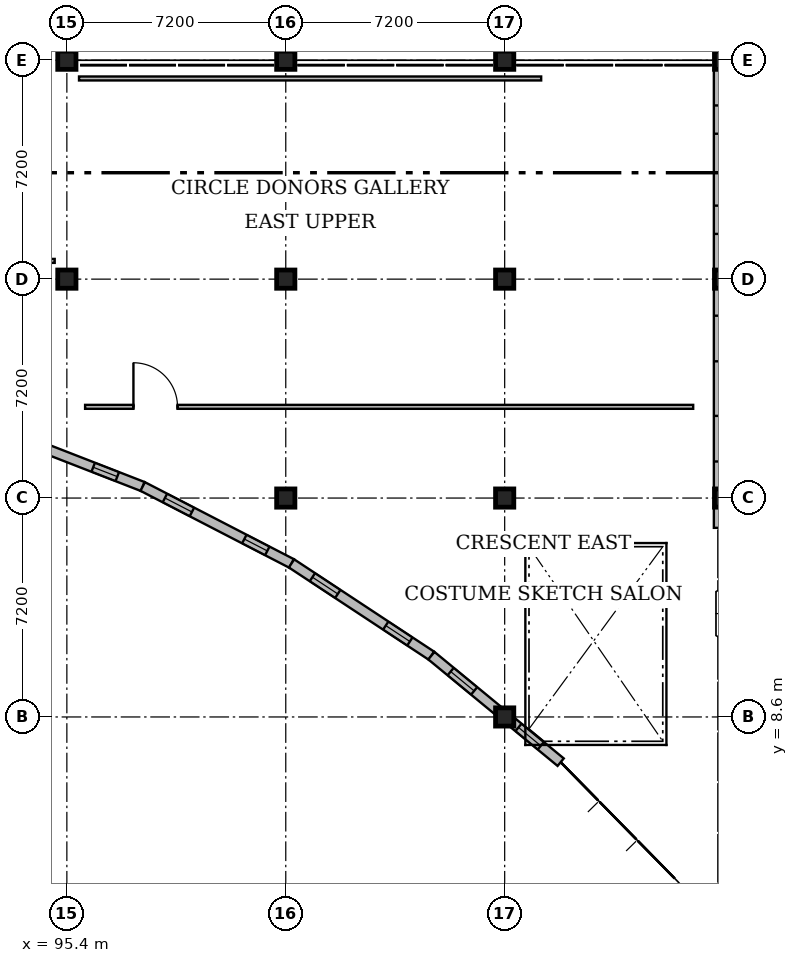
"""IFC4 building model, lengths in metres.
Left out: names, types, materials, properties, quantities, classifications, styles, units other than length and angle.
Written with IfcOpenShell. Run it as: python <this file> out.ifc"""

import sys

from ifc_helpers import new_model, si_unit, direction, frame, frame_2d, origin, origin_2d, place, context, subcontext, project, spatial, rectangle, circle, extrude, element, fill, save


model = new_model("IFC4")
c1 = context("Model", 3, precision=1e-05, world=origin(), true_north=direction((0.0, 1.0)))
c2 = subcontext(c1, "Body", "Model", "MODEL_VIEW")
j1 = project(units=[si_unit("LENGTHUNIT", "METRE"), si_unit("PLANEANGLEUNIT", "RADIAN")], contexts=[c1])
p1 = place(None, origin())
s1 = spatial("IfcSite", under=j1, at=p1, CompositionType="ELEMENT")
p2 = place(p1, origin())
s2 = spatial("IfcBuilding", under=s1, at=p2, CompositionType="ELEMENT")
p3 = place(p2, frame((0.0, 0.0, 9.0)))
s3 = spatial("IfcBuildingStorey", under=s2, at=p3, CompositionType="ELEMENT", Elevation=9.0)
for number, where, z_axis, x_axis in (
    (1, (95.4, 23.0, 0.0), (0.0, 0.0, 1.0), (1.0, 0.0, 0.0)),
    (2, (95.4, 30.2, 0.0), (0.0, 0.0, 1.0), (1.0, 0.0, 0.0)),
    (3, (102.6, 15.8, 0.0), (0.0, 0.0, 1.0), (1.0, 0.0, 0.0)),
    (4, (102.6, 23.0, 0.0), (0.0, 0.0, 1.0), (1.0, 0.0, 0.0)),
    (5, (102.6, 30.2, 0.0), (0.0, 0.0, 1.0), (1.0, 0.0, 0.0)),
    (6, (109.8, 8.6, 0.0), (0.0, 0.0, 1.0), (1.0, 0.0, 0.0)),
    (7, (109.8, 15.8, 0.0), (0.0, 0.0, 1.0), (1.0, 0.0, 0.0)),
    (8, (109.8, 23.0, 0.0), (0.0, 0.0, 1.0), (1.0, 0.0, 0.0)),
    (9, (109.8, 30.2, 0.0), (0.0, 0.0, 1.0), (1.0, 0.0, 0.0)),
    (10, (117.0, 15.8, 0.0), (0.0, 0.0, 1.0), (1.0, 0.0, 0.0)),
    (11, (117.0, 23.0, 0.0), (0.0, 0.0, 1.0), (1.0, 0.0, 0.0)),
    (12, (117.0, 30.2, 0.0), (0.0, 0.0, 1.0), (1.0, 0.0, 0.0)),
):
    element("IfcColumn", number, at=place(p3, frame(where, z_axis=z_axis, x_axis=x_axis)), inside=s3, PredefinedType="COLUMN", context=c2, shape_type="SweptSolid", body=[
        extrude(circle(Radius=0.3, at=origin_2d()), origin(), (0.0, 0.0, 1.0), 4.2),
    ])
p4 = place(p3, frame((92.76, 18.177, 0.0), z_axis=(0.0, 0.0, 1.0), x_axis=(0.931946449517, -0.362595939349, 0.0)))
e13 = element("IfcWall", 13, at=p4, inside=s3, PredefinedType="SOLIDWALL", context=c2, shape_type="SweptSolid", body=[
    extrude(rectangle(XDim=5.51, YDim=0.32, at=frame_2d((2.755, 0.0))), origin(), (0.0, 0.0, 1.0), 4.2),
])
p5 = place(p4, frame((0.823, 0.0, 0.78)))
e14 = element("IfcOpeningElement", 14, at=p5, cuts=e13, PredefinedType="OPENING", context=c2, shape_type="SweptSolid", body=[
    extrude(rectangle(XDim=1.0, YDim=1.95, at=frame_2d((0.5, 0.975))), frame((0.0, 0.18, 0.0), z_axis=(0.0, -1.0, 0.0), x_axis=(1.0, 0.0, 0.0)), (0.0, 0.0, 1.0), 0.36),
])
p6 = place(p4, frame((3.762, 0.0, 0.78)))
e15 = element("IfcOpeningElement", 15, at=p6, cuts=e13, PredefinedType="OPENING", context=c2, shape_type="SweptSolid", body=[
    extrude(rectangle(XDim=0.85, YDim=2.25, at=frame_2d((0.425, 1.125))), frame((0.0, 0.18, 0.0), z_axis=(0.0, -1.0, 0.0), x_axis=(1.0, 0.0, 0.0)), (0.0, 0.0, 1.0), 0.36),
])
p7 = place(p3, frame((97.895, 16.18, 0.0), z_axis=(0.0, 0.0, 1.0), x_axis=(0.888365365521, -0.459137209713, 0.0)))
e16 = element("IfcWall", 16, at=p7, inside=s3, PredefinedType="SOLIDWALL", context=c2, shape_type="SweptSolid", body=[
    extrude(rectangle(XDim=5.51, YDim=0.32, at=frame_2d((2.755, 0.0))), origin(), (0.0, 0.0, 1.0), 4.2),
])
p8 = place(p7, frame((0.823, 0.0, 0.633)))
e17 = element("IfcOpeningElement", 17, at=p8, cuts=e16, PredefinedType="OPENING", context=c2, shape_type="SweptSolid", body=[
    extrude(rectangle(XDim=1.0, YDim=2.05, at=frame_2d((0.5, 1.025))), frame((0.0, 0.18, 0.0), z_axis=(0.0, -1.0, 0.0), x_axis=(1.0, 0.0, 0.0)), (0.0, 0.0, 1.0), 0.36),
])
p9 = place(p7, frame((3.762, 0.0, 0.633)))
e18 = element("IfcOpeningElement", 18, at=p9, cuts=e16, PredefinedType="OPENING", context=c2, shape_type="SweptSolid", body=[
    extrude(rectangle(XDim=0.85, YDim=2.35, at=frame_2d((0.425, 1.175))), frame((0.0, 0.18, 0.0), z_axis=(0.0, -1.0, 0.0), x_axis=(1.0, 0.0, 0.0)), (0.0, 0.0, 1.0), 0.36),
])
p10 = place(p3, frame((102.79, 13.65, 0.0), z_axis=(0.0, 0.0, 1.0), x_axis=(0.834787412137, -0.550572408079, 0.0)))
e19 = element("IfcWall", 19, at=p10, inside=s3, PredefinedType="SOLIDWALL", context=c2, shape_type="SweptSolid", body=[
    extrude(rectangle(XDim=5.51, YDim=0.32, at=frame_2d((2.755, 0.0))), origin(), (0.0, 0.0, 1.0), 4.2),
])
p11 = place(p10, frame((0.822, 0.0, 0.514)))
e20 = element("IfcOpeningElement", 20, at=p11, cuts=e19, PredefinedType="OPENING", context=c2, shape_type="SweptSolid", body=[
    extrude(rectangle(XDim=1.0, YDim=2.15, at=frame_2d((0.5, 1.075))), frame((0.0, 0.18, 0.0), z_axis=(0.0, -1.0, 0.0), x_axis=(1.0, 0.0, 0.0)), (0.0, 0.0, 1.0), 0.36),
])
p12 = place(p10, frame((3.712, 0.0, 0.514)))
e21 = element("IfcOpeningElement", 21, at=p12, cuts=e19, PredefinedType="OPENING", context=c2, shape_type="SweptSolid", body=[
    extrude(rectangle(XDim=0.95, YDim=1.9, at=frame_2d((0.475, 0.95))), frame((0.0, 0.18, 0.0), z_axis=(0.0, -1.0, 0.0), x_axis=(1.0, 0.0, 0.0)), (0.0, 0.0, 1.0), 0.36),
])
p13 = place(p3, frame((107.389, 10.616, 0.0), z_axis=(0.0, 0.0, 1.0), x_axis=(0.771862443056, -0.635789563456, 0.0)))
e22 = element("IfcWall", 22, at=p13, inside=s3, PredefinedType="SOLIDWALL", context=c2, shape_type="SweptSolid", body=[
    extrude(rectangle(XDim=5.51, YDim=0.32, at=frame_2d((2.755, 0.0))), origin(), (0.0, 0.0, 1.0), 4.2),
])
p14 = place(p13, frame((0.823, 0.0, 0.448)))
e23 = element("IfcOpeningElement", 23, at=p14, cuts=e22, PredefinedType="OPENING", context=c2, shape_type="SweptSolid", body=[
    extrude(rectangle(XDim=1.0, YDim=2.25, at=frame_2d((0.5, 1.125))), frame((0.0, 0.18, 0.0), z_axis=(0.0, -1.0, 0.0), x_axis=(1.0, 0.0, 0.0)), (0.0, 0.0, 1.0), 0.36),
])
p15 = place(p13, frame((3.712, 0.0, 0.448)))
e24 = element("IfcOpeningElement", 24, at=p15, cuts=e22, PredefinedType="OPENING", context=c2, shape_type="SweptSolid", body=[
    extrude(rectangle(XDim=0.95, YDim=2.0, at=frame_2d((0.475, 1.0))), frame((0.0, 0.18, 0.0), z_axis=(0.0, -1.0, 0.0), x_axis=(1.0, 0.0, 0.0)), (0.0, 0.0, 1.0), 0.36),
])
p16 = place(p3, frame((116.84, 14.82, 0.0), z_axis=(0.0, 0.0, 1.0), x_axis=(0.0, 1.0, 0.0)))
e25 = element("IfcWall", 25, at=p16, inside=s3, PredefinedType="SOLIDWALL", context=c2, shape_type="SweptSolid", body=[
    extrude(rectangle(XDim=0.675, YDim=0.32, at=frame_2d((0.337, 0.0))), origin(), (0.0, 0.0, 1.0), 4.2),
])
p17 = place(p3, frame((116.84, 16.105, 0.0), z_axis=(0.0, 0.0, 1.0), x_axis=(0.0, 1.0, 0.0)))
e26 = element("IfcWall", 26, at=p17, inside=s3, PredefinedType="SOLIDWALL", context=c2, shape_type="SweptSolid", body=[
    extrude(rectangle(XDim=6.59, YDim=0.32, at=frame_2d((3.295, 0.0))), origin(), (0.0, 0.0, 1.0), 3.673),
])
p18 = place(p17, frame((0.897, 0.0, 0.95)))
e27 = element("IfcOpeningElement", 27, at=p18, cuts=e26, PredefinedType="OPENING", context=c2, shape_type="SweptSolid", body=[
    extrude(rectangle(XDim=1.5, YDim=2.0, at=frame_2d((0.75, 1.0))), frame((0.0, 0.18, 0.0), z_axis=(0.0, -1.0, 0.0), x_axis=(1.0, 0.0, 0.0)), (0.0, 0.0, 1.0), 0.36),
])
p19 = place(p17, frame((4.192, 0.0, 0.95)))
e28 = element("IfcOpeningElement", 28, at=p19, cuts=e26, PredefinedType="OPENING", context=c2, shape_type="SweptSolid", body=[
    extrude(rectangle(XDim=1.5, YDim=2.0, at=frame_2d((0.75, 1.0))), frame((0.0, 0.18, 0.0), z_axis=(0.0, -1.0, 0.0), x_axis=(1.0, 0.0, 0.0)), (0.0, 0.0, 1.0), 0.36),
])
p20 = place(p3, frame((116.84, 23.305, 0.0), z_axis=(0.0, 0.0, 1.0), x_axis=(0.0, 1.0, 0.0)))
e29 = element("IfcWall", 29, at=p20, inside=s3, PredefinedType="SOLIDWALL", context=c2, shape_type="SweptSolid", body=[
    extrude(rectangle(XDim=6.59, YDim=0.32, at=frame_2d((3.295, 0.0))), origin(), (0.0, 0.0, 1.0), 3.673),
])
p21 = place(p20, frame((1.183, 0.0, 0.95)))
e30 = element("IfcOpeningElement", 30, at=p21, cuts=e29, PredefinedType="OPENING", context=c2, shape_type="SweptSolid", body=[
    extrude(rectangle(XDim=0.93, YDim=1.8, at=frame_2d((0.465, 0.9))), frame((0.0, 0.18, 0.0), z_axis=(0.0, -1.0, 0.0), x_axis=(1.0, 0.0, 0.0)), (0.0, 0.0, 1.0), 0.36),
])
p22 = place(p20, frame((4.478, 0.0, 0.95)))
e31 = element("IfcOpeningElement", 31, at=p22, cuts=e29, PredefinedType="OPENING", context=c2, shape_type="SweptSolid", body=[
    extrude(rectangle(XDim=0.93, YDim=1.8, at=frame_2d((0.465, 0.9))), frame((0.0, 0.18, 0.0), z_axis=(0.0, -1.0, 0.0), x_axis=(1.0, 0.0, 0.0)), (0.0, 0.0, 1.0), 0.36),
])
p23 = place(p3, frame((95.8, 29.6, 0.0), z_axis=(0.0, 0.0, 1.0), x_axis=(1.0, 0.0, 0.0)))
e32 = element("IfcWall", 32, at=p23, inside=s3, PredefinedType="PARTITIONING", context=c2, shape_type="SweptSolid", body=[
    extrude(rectangle(XDim=15.2, YDim=0.13, at=frame_2d((7.6, 0.0))), origin(), (0.0, 0.0, 1.0), 3.96),
])
p24 = place(p3, frame((57.8, 23.6, 0.0), z_axis=(0.0, 0.0, 1.0), x_axis=(1.0, 0.0, 0.0)))
e33 = element("IfcWall", 33, at=p24, inside=s3, PredefinedType="PARTITIONING", context=c2, shape_type="SweptSolid", body=[
    extrude(rectangle(XDim=37.2, YDim=0.13, at=frame_2d((18.6, 0.0))), origin(), (0.0, 0.0, 1.0), 3.96),
])
p25 = place(p24, frame((15.265, 0.0, 0.0)))
e34 = element("IfcOpeningElement", 34, at=p25, cuts=e33, PredefinedType="OPENING", context=c2, shape_type="SweptSolid", body=[
    extrude(rectangle(XDim=1.45, YDim=2.2, at=frame_2d((0.725, 1.1))), frame((0.0, 0.085, 0.0), z_axis=(0.0, -1.0, 0.0), x_axis=(1.0, 0.0, 0.0)), (0.0, 0.0, 1.0), 0.17),
])
p26 = place(p3, frame((96.0, 18.8, 0.0), z_axis=(0.0, 0.0, 1.0), x_axis=(1.0, 0.0, 0.0)))
e35 = element("IfcWall", 35, at=p26, inside=s3, PredefinedType="PARTITIONING", context=c2, shape_type="SweptSolid", body=[
    extrude(rectangle(XDim=20.0, YDim=0.13, at=frame_2d((10.0, 0.0))), origin(), (0.0, 0.0, 1.0), 3.96),
])
p27 = place(p26, frame((1.59, 0.0, 0.0)))
e36 = element("IfcOpeningElement", 36, at=p27, cuts=e35, PredefinedType="OPENING", context=c2, shape_type="SweptSolid", body=[
    extrude(rectangle(XDim=1.45, YDim=2.2, at=frame_2d((0.725, 1.1))), frame((0.0, 0.085, 0.0), z_axis=(0.0, -1.0, 0.0), x_axis=(1.0, 0.0, 0.0)), (0.0, 0.0, 1.0), 0.17),
])
p28 = place(p6, origin())
e37 = element("IfcWindow", 37, at=p28, inside=s3, PartitioningType="SINGLE_PANEL", PredefinedType="WINDOW", context=c2, shape_type="SweptSolid", body=[
    extrude(rectangle(XDim=0.85, YDim=2.25, at=frame_2d((0.425, 1.125))), frame((0.0, 0.03, 0.0), z_axis=(0.0, -1.0, 0.0), x_axis=(1.0, 0.0, 0.0)), (0.0, 0.0, 1.0), 0.06),
])
fill(e15, e37)
p29 = place(p8, origin())
e38 = element("IfcWindow", 38, at=p29, inside=s3, PartitioningType="SINGLE_PANEL", PredefinedType="WINDOW", context=c2, shape_type="SweptSolid", body=[
    extrude(rectangle(XDim=1.0, YDim=2.05, at=frame_2d((0.5, 1.025))), frame((0.0, 0.03, 0.0), z_axis=(0.0, -1.0, 0.0), x_axis=(1.0, 0.0, 0.0)), (0.0, 0.0, 1.0), 0.06),
])
fill(e17, e38)
p30 = place(p9, origin())
e39 = element("IfcWindow", 39, at=p30, inside=s3, PartitioningType="SINGLE_PANEL", PredefinedType="WINDOW", context=c2, shape_type="SweptSolid", body=[
    extrude(rectangle(XDim=0.85, YDim=2.35, at=frame_2d((0.425, 1.175))), frame((0.0, 0.03, 0.0), z_axis=(0.0, -1.0, 0.0), x_axis=(1.0, 0.0, 0.0)), (0.0, 0.0, 1.0), 0.06),
])
fill(e18, e39)
p31 = place(p11, origin())
e40 = element("IfcWindow", 40, at=p31, inside=s3, PartitioningType="SINGLE_PANEL", PredefinedType="WINDOW", context=c2, shape_type="SweptSolid", body=[
    extrude(rectangle(XDim=1.0, YDim=2.15, at=frame_2d((0.5, 1.075))), frame((0.0, 0.03, 0.0), z_axis=(0.0, -1.0, 0.0), x_axis=(1.0, 0.0, 0.0)), (0.0, 0.0, 1.0), 0.06),
])
fill(e20, e40)
p32 = place(p12, origin())
e41 = element("IfcWindow", 41, at=p32, inside=s3, PartitioningType="SINGLE_PANEL", PredefinedType="WINDOW", context=c2, shape_type="SweptSolid", body=[
    extrude(rectangle(XDim=0.95, YDim=1.9, at=frame_2d((0.475, 0.95))), frame((0.0, 0.03, 0.0), z_axis=(0.0, -1.0, 0.0), x_axis=(1.0, 0.0, 0.0)), (0.0, 0.0, 1.0), 0.06),
])
fill(e21, e41)
p33 = place(p14, origin())
e42 = element("IfcWindow", 42, at=p33, inside=s3, PartitioningType="SINGLE_PANEL", PredefinedType="WINDOW", context=c2, shape_type="SweptSolid", body=[
    extrude(rectangle(XDim=1.0, YDim=2.25, at=frame_2d((0.5, 1.125))), frame((0.0, 0.03, 0.0), z_axis=(0.0, -1.0, 0.0), x_axis=(1.0, 0.0, 0.0)), (0.0, 0.0, 1.0), 0.06),
])
fill(e23, e42)
p34 = place(p15, origin())
e43 = element("IfcWindow", 43, at=p34, inside=s3, PartitioningType="SINGLE_PANEL", PredefinedType="WINDOW", context=c2, shape_type="SweptSolid", body=[
    extrude(rectangle(XDim=0.95, YDim=2.0, at=frame_2d((0.475, 1.0))), frame((0.0, 0.03, 0.0), z_axis=(0.0, -1.0, 0.0), x_axis=(1.0, 0.0, 0.0)), (0.0, 0.0, 1.0), 0.06),
])
fill(e24, e43)
p35 = place(p18, origin())
e44 = element("IfcWindow", 44, at=p35, inside=s3, PartitioningType="SINGLE_PANEL", PredefinedType="WINDOW", context=c2, shape_type="SweptSolid", body=[
    extrude(rectangle(XDim=1.5, YDim=2.0, at=frame_2d((0.75, 1.0))), frame((0.0, 0.03, 0.0), z_axis=(0.0, -1.0, 0.0), x_axis=(1.0, 0.0, 0.0)), (0.0, 0.0, 1.0), 0.06),
])
fill(e27, e44)
p36 = place(p19, origin())
e45 = element("IfcWindow", 45, at=p36, inside=s3, PartitioningType="SINGLE_PANEL", PredefinedType="WINDOW", context=c2, shape_type="SweptSolid", body=[
    extrude(rectangle(XDim=1.5, YDim=2.0, at=frame_2d((0.75, 1.0))), frame((0.0, 0.03, 0.0), z_axis=(0.0, -1.0, 0.0), x_axis=(1.0, 0.0, 0.0)), (0.0, 0.0, 1.0), 0.06),
])
fill(e28, e45)
p37 = place(p21, origin())
e46 = element("IfcWindow", 46, at=p37, inside=s3, PartitioningType="SINGLE_PANEL", PredefinedType="WINDOW", context=c2, shape_type="SweptSolid", body=[
    extrude(rectangle(XDim=0.93, YDim=1.8, at=frame_2d((0.465, 0.9))), frame((0.0, 0.03, 0.0), z_axis=(0.0, -1.0, 0.0), x_axis=(1.0, 0.0, 0.0)), (0.0, 0.0, 1.0), 0.06),
])
fill(e30, e46)
p38 = place(p22, origin())
e47 = element("IfcWindow", 47, at=p38, inside=s3, PartitioningType="SINGLE_PANEL", PredefinedType="WINDOW", context=c2, shape_type="SweptSolid", body=[
    extrude(rectangle(XDim=0.93, YDim=1.8, at=frame_2d((0.465, 0.9))), frame((0.0, 0.03, 0.0), z_axis=(0.0, -1.0, 0.0), x_axis=(1.0, 0.0, 0.0)), (0.0, 0.0, 1.0), 0.06),
])
fill(e31, e47)
p39 = place(p27, origin())
e48 = element("IfcDoor", 48, at=p39, inside=s3, OperationType="DOUBLE_DOOR_SINGLE_SWING", PredefinedType="DOOR", context=c2, shape_type="SweptSolid", body=[
    extrude(rectangle(XDim=1.45, YDim=2.2, at=frame_2d((0.725, 1.1))), frame((0.0, 0.025, 0.0), z_axis=(0.0, -1.0, 0.0), x_axis=(1.0, 0.0, 0.0)), (0.0, 0.0, 1.0), 0.05),
])
fill(e36, e48)
save(model, sys.argv[1])
